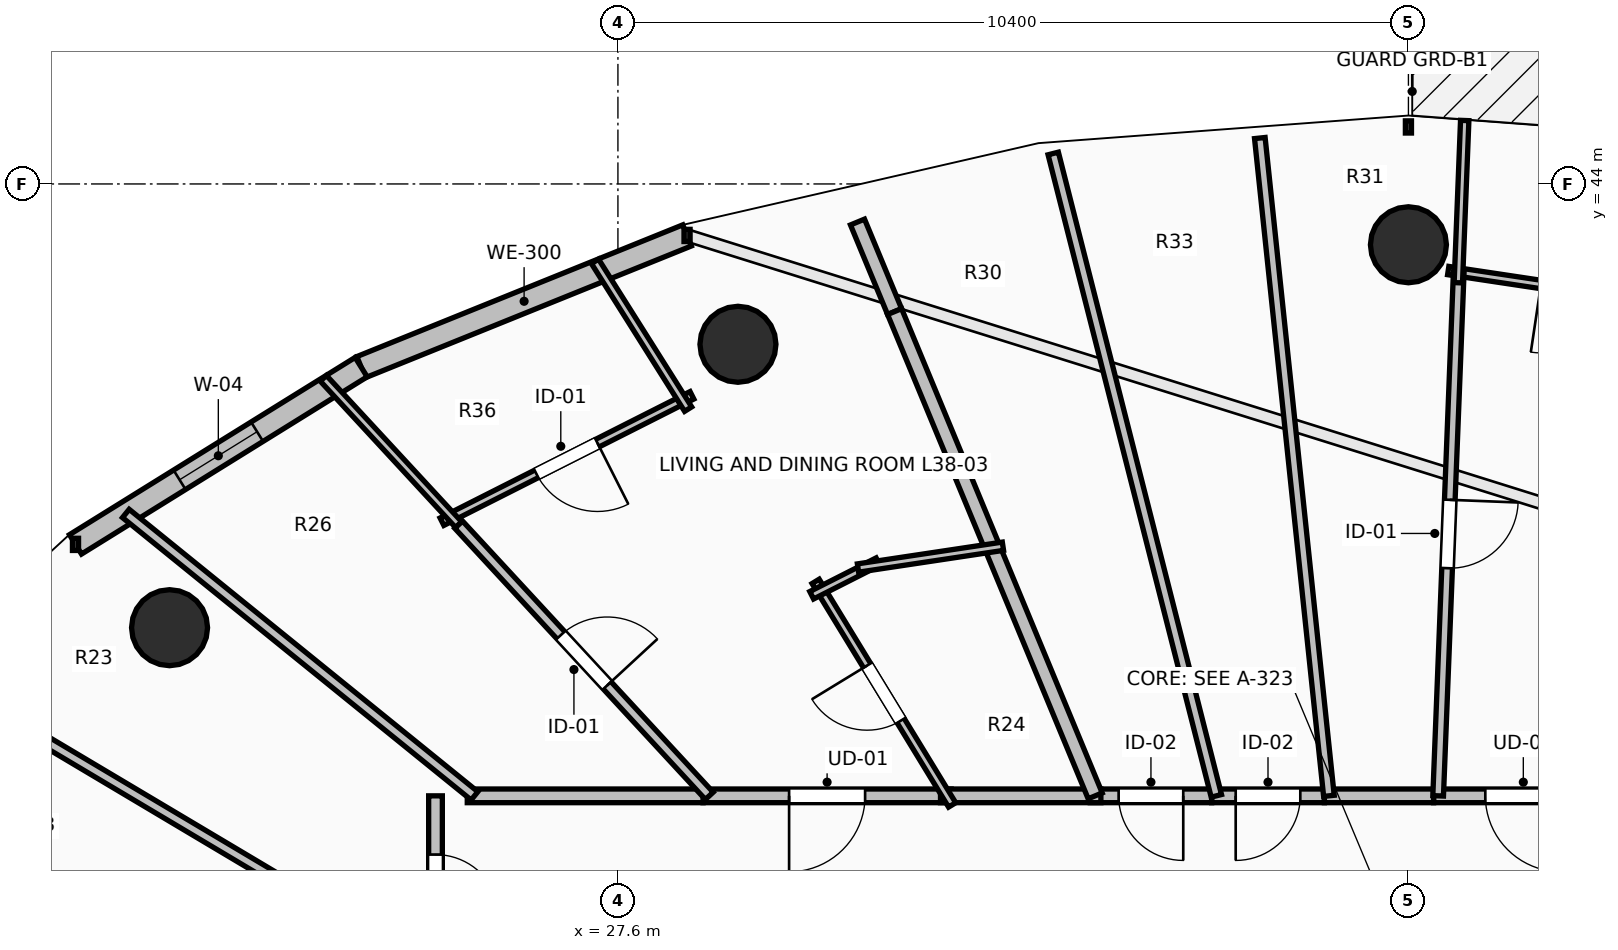
"""IFC4 building model, lengths in metres.
Left out: names, types, materials, properties, quantities, classifications, styles, units other than length and angle.
Written with IfcOpenShell. Run it as: python <this file> out.ifc"""

import sys

from ifc_helpers import new_model, si_unit, direction, frame, frame_2d, origin, origin_2d, place, context, subcontext, project, spatial, rectangle, circle, extrude, element, fill, save


model = new_model("IFC4")
c1 = context("Model", 3, precision=1e-05, world=origin(), true_north=direction((0.0, 1.0)))
c2 = subcontext(c1, "Body", "Model", "MODEL_VIEW")
j1 = project(units=[si_unit("LENGTHUNIT", "METRE"), si_unit("PLANEANGLEUNIT", "RADIAN")], contexts=[c1])
p1 = place(None, origin())
s1 = spatial("IfcSite", under=j1, at=p1, CompositionType="ELEMENT")
p2 = place(p1, origin())
s2 = spatial("IfcBuilding", under=s1, at=p2, CompositionType="ELEMENT")
p3 = place(p2, frame((0.0, 0.0, 143.1)))
s3 = spatial("IfcBuildingStorey", under=s2, at=p3, CompositionType="ELEMENT", Elevation=143.1)
for number, where, z_axis, x_axis in (
    (1, (38.0, 43.2, 0.0), (0.0, 0.0, 1.0), (0.0, 1.0, 0.0)),
    (2, (29.179, 41.891, 0.0), (0.0, 0.0, 1.0), (-0.383, 0.924, 0.0)),
    (3, (21.701, 38.162, 0.0), (0.0, 0.0, 1.0), (-0.707, 0.707, 0.0)),
):
    element("IfcColumn", number, at=place(p3, frame(where, z_axis=z_axis, x_axis=x_axis)), inside=s3, PredefinedType="COLUMN", context=c2, shape_type="SweptSolid", body=[
        extrude(circle(Radius=0.5, at=origin_2d()), origin(), (0.0, 0.0, 1.0), 3.5),
    ])
p4 = place(p3, frame((28.51, 43.323, 0.0), z_axis=(0.0, 0.0, 1.0), x_axis=(-0.927156504392, -0.374674280359, 0.0)))
e4 = element("IfcWall", 4, at=p4, inside=s3, PredefinedType="STANDARD", context=c2, shape_type="SweptSolid", body=[
    extrude(rectangle(XDim=4.625, YDim=0.3, at=frame_2d((2.312, 0.0))), origin(), (0.0, 0.0, 1.0), 3.24),
])
p5 = place(p3, frame((24.222, 41.59, 0.0), z_axis=(0.0, 0.0, 1.0), x_axis=(-0.849721181976, -0.527232313977, 0.0)))
e5 = element("IfcWall", 5, at=p5, inside=s3, PredefinedType="STANDARD", context=c2, shape_type="SweptSolid", body=[
    extrude(rectangle(XDim=4.423, YDim=0.3, at=frame_2d((2.211, 0.0))), origin(), (0.0, 0.0, 1.0), 3.24),
])
p6 = place(p5, frame((1.611, 0.0, 0.85)))
e6 = element("IfcOpeningElement", 6, at=p6, cuts=e5, PredefinedType="OPENING", context=c2, shape_type="SweptSolid", body=[
    extrude(rectangle(XDim=1.2, YDim=1.95, at=frame_2d((0.6, 0.975))), frame((0.0, 0.165, 0.0), z_axis=(0.0, -1.0, 0.0), x_axis=(1.0, 0.0, 0.0)), (0.0, 0.0, 1.0), 0.33),
])
p7 = place(p3, frame((40.692, 35.95, 0.0), z_axis=(0.0, 0.0, 1.0), x_axis=(-1.0, 0.0, 0.0)))
e7 = element("IfcWall", 7, at=p7, inside=s3, PredefinedType="PARTITIONING", context=c2, shape_type="SweptSolid", body=[
    extrude(rectangle(XDim=2.361, YDim=0.18, at=frame_2d((1.18, 0.0))), origin(), (0.0, 0.0, 1.0), 3.24),
])
p8 = place(p7, frame((0.68, 0.0, 0.0)))
e8 = element("IfcOpeningElement", 8, at=p8, cuts=e7, PredefinedType="OPENING", context=c2, shape_type="SweptSolid", body=[
    extrude(rectangle(XDim=1.0, YDim=2.15, at=frame_2d((0.5, 1.075))), frame((0.0, 0.105, 0.0), z_axis=(0.0, -1.0, 0.0), x_axis=(1.0, 0.0, 0.0)), (0.0, 0.0, 1.0), 0.21),
])
p9 = place(p3, frame((38.331, 35.95, 0.0), z_axis=(0.0, 0.0, 1.0), x_axis=(-1.0, 0.0, 0.0)))
e9 = element("IfcWall", 9, at=p9, inside=s3, PredefinedType="PARTITIONING", context=c2, shape_type="SweptSolid", body=[
    extrude(rectangle(XDim=1.437, YDim=0.18, at=frame_2d((0.719, 0.0))), origin(), (0.0, 0.0, 1.0), 3.24),
])
p10 = place(p3, frame((36.894, 35.95, 0.0), z_axis=(0.0, 0.0, 1.0), x_axis=(-1.0, 0.0, 0.0)))
e10 = element("IfcWall", 10, at=p10, inside=s3, PredefinedType="PARTITIONING", context=c2, shape_type="SweptSolid", body=[
    extrude(rectangle(XDim=1.483, YDim=0.18, at=frame_2d((0.742, 0.0))), origin(), (0.0, 0.0, 1.0), 3.24),
])
p11 = place(p10, frame((0.316, 0.0, 0.0)))
e11 = element("IfcOpeningElement", 11, at=p11, cuts=e10, PredefinedType="OPENING", context=c2, shape_type="SweptSolid", body=[
    extrude(rectangle(XDim=0.85, YDim=2.1, at=frame_2d((0.425, 1.05))), frame((0.0, 0.105, 0.0), z_axis=(0.0, -1.0, 0.0), x_axis=(1.0, 0.0, 0.0)), (0.0, 0.0, 1.0), 0.21),
])
p12 = place(p3, frame((35.411, 35.95, 0.0), z_axis=(0.0, 0.0, 1.0), x_axis=(-1.0, 0.0, 0.0)))
e12 = element("IfcWall", 12, at=p12, inside=s3, PredefinedType="PARTITIONING", context=c2, shape_type="SweptSolid", body=[
    extrude(rectangle(XDim=1.597, YDim=0.18, at=frame_2d((0.798, 0.0))), origin(), (0.0, 0.0, 1.0), 3.24),
])
p13 = place(p12, frame((0.374, 0.0, 0.0)))
e13 = element("IfcOpeningElement", 13, at=p13, cuts=e12, PredefinedType="OPENING", context=c2, shape_type="SweptSolid", body=[
    extrude(rectangle(XDim=0.85, YDim=2.1, at=frame_2d((0.425, 1.05))), frame((0.0, 0.105, 0.0), z_axis=(0.0, -1.0, 0.0), x_axis=(1.0, 0.0, 0.0)), (0.0, 0.0, 1.0), 0.21),
])
p14 = place(p3, frame((31.984, 35.95, 0.0), z_axis=(0.0, 0.0, 1.0), x_axis=(-1.0, 0.0, 0.0)))
e14 = element("IfcWall", 14, at=p14, inside=s3, PredefinedType="PARTITIONING", context=c2, shape_type="SweptSolid", body=[
    extrude(rectangle(XDim=3.264, YDim=0.18, at=frame_2d((1.632, 0.0))), origin(), (0.0, 0.0, 1.0), 2.432),
])
p15 = place(p14, frame((1.132, 0.0, 0.0)))
e15 = element("IfcOpeningElement", 15, at=p15, cuts=e14, PredefinedType="OPENING", context=c2, shape_type="SweptSolid", body=[
    extrude(rectangle(XDim=1.0, YDim=2.15, at=frame_2d((0.5, 1.075))), frame((0.0, 0.105, 0.0), z_axis=(0.0, -1.0, 0.0), x_axis=(1.0, 0.0, 0.0)), (0.0, 0.0, 1.0), 0.21),
])
p16 = place(p3, frame((33.954, 35.95, 0.0), z_axis=(0.0, 0.0, 1.0), x_axis=(-1.0, 0.0, 0.0)))
e16 = element("IfcWall", 16, at=p16, inside=s3, PredefinedType="PARTITIONING", context=c2, shape_type="SweptSolid", body=[
    extrude(rectangle(XDim=2.11, YDim=0.18, at=frame_2d((1.055, 0.0))), origin(), (0.0, 0.0, 1.0), 3.24),
])
p17 = place(p3, frame((28.72, 35.95, 0.0), z_axis=(0.0, 0.0, 1.0), x_axis=(-1.0, 0.0, 0.0)))
e17 = element("IfcWall", 17, at=p17, inside=s3, PredefinedType="PARTITIONING", context=c2, shape_type="SweptSolid", body=[
    extrude(rectangle(XDim=3.102, YDim=0.18, at=frame_2d((1.551, 0.0))), origin(), (0.0, 0.0, 1.0), 2.432),
])
p18 = place(p3, frame((25.2, 35.95, 0.0), z_axis=(0.0, 0.0, 1.0), x_axis=(0.0, -1.0, 0.0)))
e18 = element("IfcWall", 18, at=p18, inside=s3, PredefinedType="PARTITIONING", context=c2, shape_type="SweptSolid", body=[
    extrude(rectangle(XDim=2.395, YDim=0.18, at=frame_2d((1.198, 0.0))), origin(), (0.0, 0.0, 1.0), 2.432),
])
p19 = place(p18, frame((0.772, 0.0, 0.0)))
e19 = element("IfcOpeningElement", 19, at=p19, cuts=e18, PredefinedType="OPENING", context=c2, shape_type="SweptSolid", body=[
    extrude(rectangle(XDim=0.85, YDim=2.1, at=frame_2d((0.425, 1.05))), frame((0.0, 0.105, 0.0), z_axis=(0.0, -1.0, 0.0), x_axis=(1.0, 0.0, 0.0)), (0.0, 0.0, 1.0), 0.21),
])
p20 = place(p3, frame((41.854, 42.36, 0.0), z_axis=(0.0, 0.0, 1.0), x_axis=(-0.988887919082, 0.148662986296, 0.0)))
e20 = element("IfcWall", 20, at=p20, inside=s3, PredefinedType="PARTITIONING", context=c2, shape_type="SweptSolid", body=[
    extrude(rectangle(XDim=3.368, YDim=0.11, at=frame_2d((1.684, 0.0))), origin(), (0.0, 0.0, 1.0), 3.24),
])
p21 = place(p20, frame((1.234, 0.0, 0.0)))
e21 = element("IfcOpeningElement", 21, at=p21, cuts=e20, PredefinedType="OPENING", context=c2, shape_type="SweptSolid", body=[
    extrude(rectangle(XDim=0.9, YDim=2.1, at=frame_2d((0.45, 1.05))), frame((0.0, 0.07, 0.0), z_axis=(0.0, -1.0, 0.0), x_axis=(1.0, 0.0, 0.0)), (0.0, 0.0, 1.0), 0.14),
])
p22 = place(p3, frame((38.662, 42.84, 0.0), z_axis=(0.0, 0.0, 1.0), x_axis=(-0.039300632457, -0.999227431713, 0.0)))
e22 = element("IfcWall", 22, at=p22, inside=s3, PredefinedType="PARTITIONING", context=c2, shape_type="SweptSolid", body=[
    extrude(rectangle(XDim=6.896, YDim=0.14, at=frame_2d((3.448, 0.0))), origin(), (0.0, 0.0, 1.0), 2.922),
])
p23 = place(p22, frame((2.998, 0.0, 0.0)))
e23 = element("IfcOpeningElement", 23, at=p23, cuts=e22, PredefinedType="OPENING", context=c2, shape_type="SweptSolid", body=[
    extrude(rectangle(XDim=0.9, YDim=2.1, at=frame_2d((0.45, 1.05))), frame((0.0, 0.085, 0.0), z_axis=(0.0, -1.0, 0.0), x_axis=(1.0, 0.0, 0.0)), (0.0, 0.0, 1.0), 0.17),
])
p24 = place(p3, frame((38.74, 44.835, 0.0), z_axis=(0.0, 0.0, 1.0), x_axis=(-0.039310852952, -0.999227029679, 0.0)))
e24 = element("IfcWall", 24, at=p24, inside=s3, PredefinedType="PARTITIONING", context=c2, shape_type="SweptSolid", body=[
    extrude(rectangle(XDim=2.136, YDim=0.11, at=frame_2d((1.068, 0.0))), origin(), (0.0, 0.0, 1.0), 2.728),
])
p25 = place(p3, frame((36.045, 44.604, 0.0), z_axis=(0.0, 0.0, 1.0), x_axis=(0.104483235172, -0.994526647993, 0.0)))
e25 = element("IfcWall", 25, at=p25, inside=s3, PredefinedType="PARTITIONING", context=c2, shape_type="SweptSolid", body=[
    extrude(rectangle(XDim=8.702, YDim=0.14, at=frame_2d((4.351, 0.0))), origin(), (0.0, 0.0, 1.0), 2.432),
])
p26 = place(p3, frame((33.327, 44.401, 0.0), z_axis=(0.0, 0.0, 1.0), x_axis=(0.246124619458, -0.969238191415, 0.0)))
e26 = element("IfcWall", 26, at=p26, inside=s3, PredefinedType="PARTITIONING", context=c2, shape_type="SweptSolid", body=[
    extrude(rectangle(XDim=8.719, YDim=0.14, at=frame_2d((4.36, 0.0))), origin(), (0.0, 0.0, 1.0), 2.432),
])
p27 = place(p3, frame((30.752, 43.499, 0.0), z_axis=(0.0, 0.0, 1.0), x_axis=(0.382752000821, -0.923851127546, 0.0)))
e27 = element("IfcWall", 27, at=p27, inside=s3, PredefinedType="PARTITIONING", context=c2, shape_type="SweptSolid", body=[
    extrude(rectangle(XDim=1.275, YDim=0.2, at=frame_2d((0.638, 0.0))), origin(), (0.0, 0.0, 1.0), 2.728),
])
p28 = place(p3, frame((31.24, 42.321, 0.0), z_axis=(0.0, 0.0, 1.0), x_axis=(0.382673849319, -0.923883501881, 0.0)))
e28 = element("IfcWall", 28, at=p28, inside=s3, PredefinedType="PARTITIONING", context=c2, shape_type="SweptSolid", body=[
    extrude(rectangle(XDim=6.896, YDim=0.2, at=frame_2d((3.448, 0.0))), origin(), (0.0, 0.0, 1.0), 2.432),
])
p29 = place(p3, frame((31.997, 35.831, 0.0), z_axis=(0.0, 0.0, 1.0), x_axis=(-0.521220733209, 0.853421904613, 0.0)))
e29 = element("IfcWall", 29, at=p29, inside=s3, PredefinedType="PARTITIONING", context=c2, shape_type="SweptSolid", body=[
    extrude(rectangle(XDim=3.446, YDim=0.11, at=frame_2d((1.723, 0.0))), origin(), (0.0, 0.0, 1.0), 2.432),
])
p30 = place(p29, frame((1.298, 0.0, 0.0)))
e30 = element("IfcOpeningElement", 30, at=p30, cuts=e29, PredefinedType="OPENING", context=c2, shape_type="SweptSolid", body=[
    extrude(rectangle(XDim=0.85, YDim=2.1, at=frame_2d((0.425, 1.05))), frame((0.0, 0.07, 0.0), z_axis=(0.0, -1.0, 0.0), x_axis=(1.0, 0.0, 0.0)), (0.0, 0.0, 1.0), 0.14),
])
p31 = place(p3, frame((30.149, 38.589, 0.0), z_axis=(0.0, 0.0, 1.0), x_axis=(0.891868081409, 0.452295617229, 0.0)))
e31 = element("IfcWall", 31, at=p31, inside=s3, PredefinedType="PARTITIONING", context=c2, shape_type="SweptSolid", body=[
    extrude(rectangle(XDim=0.979, YDim=0.11, at=frame_2d((0.489, 0.0))), origin(), (0.0, 0.0, 1.0), 2.922),
])
p32 = place(p3, frame((30.759, 38.947, 0.0), z_axis=(0.0, 0.0, 1.0), x_axis=(0.988889867338, 0.148650026153, 0.0)))
e32 = element("IfcWall", 32, at=p32, inside=s3, PredefinedType="PARTITIONING", context=c2, shape_type="SweptSolid", body=[
    extrude(rectangle(XDim=1.928, YDim=0.11, at=frame_2d((0.964, 0.0))), origin(), (0.0, 0.0, 1.0), 2.922),
])
p33 = place(p3, frame((28.574, 41.219, 0.0), z_axis=(0.0, 0.0, 1.0), x_axis=(-0.892470920122, -0.451104928744, 0.0)))
e33 = element("IfcWall", 33, at=p33, inside=s3, PredefinedType="PARTITIONING", context=c2, shape_type="SweptSolid", body=[
    extrude(rectangle(XDim=3.685, YDim=0.11, at=frame_2d((1.843, 0.0))), origin(), (0.0, 0.0, 1.0), 3.24),
])
p34 = place(p33, frame((1.393, 0.0, 0.0)))
e34 = element("IfcOpeningElement", 34, at=p34, cuts=e33, PredefinedType="OPENING", context=c2, shape_type="SweptSolid", body=[
    extrude(rectangle(XDim=0.9, YDim=2.1, at=frame_2d((0.45, 1.05))), frame((0.0, 0.07, 0.0), z_axis=(0.0, -1.0, 0.0), x_axis=(1.0, 0.0, 0.0)), (0.0, 0.0, 1.0), 0.14),
])
p35 = place(p3, frame((25.505, 39.517, 0.0), z_axis=(0.0, 0.0, 1.0), x_axis=(-0.678720806978, 0.734396395808, 0.0)))
e35 = element("IfcWall", 35, at=p35, inside=s3, PredefinedType="PARTITIONING", context=c2, shape_type="SweptSolid", body=[
    extrude(rectangle(XDim=2.622, YDim=0.11, at=frame_2d((1.311, 0.0))), origin(), (0.0, 0.0, 1.0), 2.728),
])
p36 = place(p3, frame((27.298, 42.981, 0.0), z_axis=(0.0, 0.0, 1.0), x_axis=(0.533261254764, -0.845950609769, 0.0)))
e36 = element("IfcWall", 36, at=p36, inside=s3, PredefinedType="PARTITIONING", context=c2, shape_type="SweptSolid", body=[
    extrude(rectangle(XDim=2.298, YDim=0.11, at=frame_2d((1.149, 0.0))), origin(), (0.0, 0.0, 1.0), 2.728),
])
p37 = place(p3, frame((25.505, 39.517, 0.0), z_axis=(0.0, 0.0, 1.0), x_axis=(0.678766339668, -0.734354312395, 0.0)))
e37 = element("IfcWall", 37, at=p37, inside=s3, PredefinedType="PARTITIONING", context=c2, shape_type="SweptSolid", body=[
    extrude(rectangle(XDim=4.857, YDim=0.14, at=frame_2d((2.429, 0.0))), origin(), (0.0, 0.0, 1.0), 2.432),
])
p38 = place(p37, frame((1.979, 0.0, 0.0)))
e38 = element("IfcOpeningElement", 38, at=p38, cuts=e37, PredefinedType="OPENING", context=c2, shape_type="SweptSolid", body=[
    extrude(rectangle(XDim=0.9, YDim=2.1, at=frame_2d((0.45, 1.05))), frame((0.0, 0.085, 0.0), z_axis=(0.0, -1.0, 0.0), x_axis=(1.0, 0.0, 0.0)), (0.0, 0.0, 1.0), 0.17),
])
p39 = place(p3, frame((21.126, 39.665, 0.0), z_axis=(0.0, 0.0, 1.0), x_axis=(0.777089771819, -0.629389773141, 0.0)))
e39 = element("IfcWall", 39, at=p39, inside=s3, PredefinedType="PARTITIONING", context=c2, shape_type="SweptSolid", body=[
    extrude(rectangle(XDim=5.903, YDim=0.14, at=frame_2d((2.951, 0.0))), origin(), (0.0, 0.0, 1.0), 2.728),
])
p40 = place(p3, frame((18.603, 37.54, 0.0), z_axis=(0.0, 0.0, 1.0), x_axis=(0.859389720334, -0.511321140365, 0.0)))
e40 = element("IfcWall", 40, at=p40, inside=s3, PredefinedType="PARTITIONING", context=c2, shape_type="SweptSolid", body=[
    extrude(rectangle(XDim=7.676, YDim=0.14, at=frame_2d((3.838, 0.0))), origin(), (0.0, 0.0, 1.0), 2.728),
])
p41 = place(p3, frame((16.355, 34.966, 0.0), z_axis=(0.0, 0.0, 1.0), x_axis=(0.923874659351, -0.382695197002, 0.0)))
e41 = element("IfcWall", 41, at=p41, inside=s3, PredefinedType="PARTITIONING", context=c2, shape_type="SweptSolid", body=[
    extrude(rectangle(XDim=4.353, YDim=0.2, at=frame_2d((2.177, 0.0))), origin(), (0.0, 0.0, 1.0), 2.728),
])
p42 = place(p6, origin())
e42 = element("IfcWindow", 42, at=p42, inside=s3, PartitioningType="SINGLE_PANEL", PredefinedType="WINDOW", context=c2, shape_type="SweptSolid", body=[
    extrude(rectangle(XDim=1.2, YDim=1.95, at=frame_2d((0.6, 0.975))), frame((0.0, 0.03, 0.0), z_axis=(0.0, -1.0, 0.0), x_axis=(1.0, 0.0, 0.0)), (0.0, 0.0, 1.0), 0.06),
])
fill(e6, e42)
p43 = place(p8, origin())
e43 = element("IfcDoor", 43, at=p43, inside=s3, OperationType="SINGLE_SWING_LEFT", PredefinedType="DOOR", context=c2, shape_type="SweptSolid", body=[
    extrude(rectangle(XDim=1.0, YDim=2.15, at=frame_2d((0.5, 1.075))), frame((0.0, 0.025, 0.0), z_axis=(0.0, -1.0, 0.0), x_axis=(1.0, 0.0, 0.0)), (0.0, 0.0, 1.0), 0.05),
])
fill(e8, e43)
p44 = place(p15, origin())
e44 = element("IfcDoor", 44, at=p44, inside=s3, OperationType="SINGLE_SWING_RIGHT", PredefinedType="DOOR", context=c2, shape_type="SweptSolid", body=[
    extrude(rectangle(XDim=1.0, YDim=2.15, at=frame_2d((0.5, 1.075))), frame((0.0, 0.025, 0.0), z_axis=(0.0, -1.0, 0.0), x_axis=(1.0, 0.0, 0.0)), (0.0, 0.0, 1.0), 0.05),
])
fill(e15, e44)
p45 = place(p23, origin())
e45 = element("IfcDoor", 45, at=p45, inside=s3, OperationType="SINGLE_SWING_LEFT", PredefinedType="DOOR", context=c2, shape_type="SweptSolid", body=[
    extrude(rectangle(XDim=0.9, YDim=2.1, at=frame_2d((0.45, 1.05))), frame((0.0, 0.025, 0.0), z_axis=(0.0, -1.0, 0.0), x_axis=(1.0, 0.0, 0.0)), (0.0, 0.0, 1.0), 0.05),
])
fill(e23, e45)
p46 = place(p30, origin())
e46 = element("IfcDoor", 46, at=p46, inside=s3, OperationType="SINGLE_SWING_RIGHT", PredefinedType="DOOR", context=c2, shape_type="SweptSolid", body=[
    extrude(rectangle(XDim=0.85, YDim=2.1, at=frame_2d((0.425, 1.05))), frame((0.0, 0.025, 0.0), z_axis=(0.0, -1.0, 0.0), x_axis=(1.0, 0.0, 0.0)), (0.0, 0.0, 1.0), 0.05),
])
fill(e30, e46)
p47 = place(p34, origin())
e47 = element("IfcDoor", 47, at=p47, inside=s3, OperationType="SINGLE_SWING_LEFT", PredefinedType="DOOR", context=c2, shape_type="SweptSolid", body=[
    extrude(rectangle(XDim=0.9, YDim=2.1, at=frame_2d((0.45, 1.05))), frame((0.0, 0.025, 0.0), z_axis=(0.0, -1.0, 0.0), x_axis=(1.0, 0.0, 0.0)), (0.0, 0.0, 1.0), 0.05),
])
fill(e34, e47)
p48 = place(p38, origin())
e48 = element("IfcDoor", 48, at=p48, inside=s3, OperationType="SINGLE_SWING_RIGHT", PredefinedType="DOOR", context=c2, shape_type="SweptSolid", body=[
    extrude(rectangle(XDim=0.9, YDim=2.1, at=frame_2d((0.45, 1.05))), frame((0.0, 0.025, 0.0), z_axis=(0.0, -1.0, 0.0), x_axis=(1.0, 0.0, 0.0)), (0.0, 0.0, 1.0), 0.05),
])
fill(e38, e48)
p49 = place(p11, origin())
e49 = element("IfcDoor", 49, at=p49, inside=s3, OperationType="SINGLE_SWING_RIGHT", PredefinedType="DOOR", context=c2, shape_type="SweptSolid", body=[
    extrude(rectangle(XDim=0.85, YDim=2.1, at=frame_2d((0.425, 1.05))), frame((0.0, 0.025, 0.0), z_axis=(0.0, -1.0, 0.0), x_axis=(1.0, 0.0, 0.0)), (0.0, 0.0, 1.0), 0.05),
])
fill(e11, e49)
p50 = place(p13, origin())
e50 = element("IfcDoor", 50, at=p50, inside=s3, OperationType="SINGLE_SWING_LEFT", PredefinedType="DOOR", context=c2, shape_type="SweptSolid", body=[
    extrude(rectangle(XDim=0.85, YDim=2.1, at=frame_2d((0.425, 1.05))), frame((0.0, 0.025, 0.0), z_axis=(0.0, -1.0, 0.0), x_axis=(1.0, 0.0, 0.0)), (0.0, 0.0, 1.0), 0.05),
])
fill(e13, e50)
p51 = place(p19, origin())
e51 = element("IfcDoor", 51, at=p51, inside=s3, OperationType="SINGLE_SWING_RIGHT", PredefinedType="DOOR", context=c2, shape_type="SweptSolid", body=[
    extrude(rectangle(XDim=0.85, YDim=2.1, at=frame_2d((0.425, 1.05))), frame((0.0, 0.025, 0.0), z_axis=(0.0, -1.0, 0.0), x_axis=(1.0, 0.0, 0.0)), (0.0, 0.0, 1.0), 0.05),
])
fill(e19, e51)
save(model, sys.argv[1])
